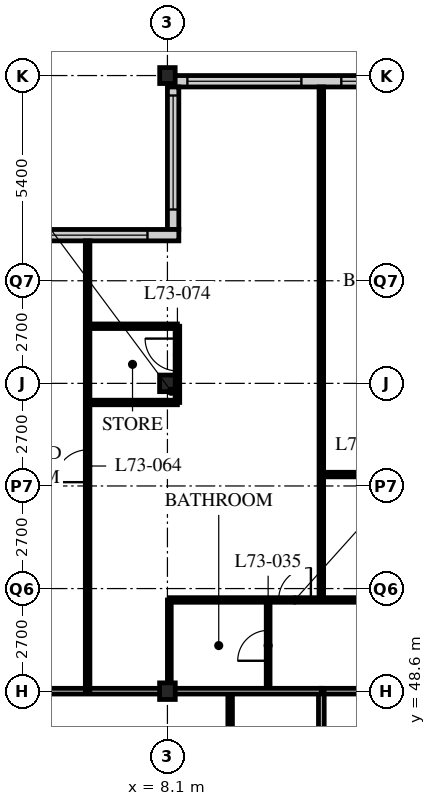
"""IFC4 building model, lengths in metres.
Left out: names, types, materials, properties, quantities, classifications, styles, units other than length and angle.
Written with IfcOpenShell. Run it as: python <this file> out.ifc"""

import sys

from ifc_helpers import new_model, si_unit, direction, frame, frame_2d, origin, origin_2d, place, context, subcontext, project, spatial, rectangle, i_section, extrude, element, fill, save


model = new_model("IFC4")
c1 = context("Model", 3, precision=1e-05, world=origin(), true_north=direction((0.0, 1.0)))
c2 = subcontext(c1, "Body", "Model", "MODEL_VIEW")
j1 = project(units=[si_unit("LENGTHUNIT", "METRE"), si_unit("PLANEANGLEUNIT", "RADIAN")], contexts=[c1])
p1 = place(None, origin())
s1 = spatial("IfcSite", under=j1, at=p1, CompositionType="ELEMENT")
p2 = place(p1, origin())
s2 = spatial("IfcBuilding", under=s1, at=p2, CompositionType="ELEMENT")
p3 = place(p2, frame((0.0, 0.0, 285.3)))
s3 = spatial("IfcBuildingStorey", under=s2, at=p3, CompositionType="ELEMENT", Elevation=285.3)
for number, where, z_axis, x_axis in (
    (1, (8.1, 48.6, 0.0), (0.0, 0.0, 1.0), (1.0, 0.0, 0.0)),
    (2, (8.1, 56.7, 0.0), (0.0, 0.0, 1.0), (1.0, 0.0, 0.0)),
):
    element("IfcColumn", number, at=place(p3, frame(where, z_axis=z_axis, x_axis=x_axis)), inside=s3, PredefinedType="COLUMN", context=c2, shape_type="SweptSolid", body=[
        extrude(i_section(OverallWidth=0.412, OverallDepth=0.437, WebThickness=0.036, FlangeThickness=0.058, FilletRadius=0.015, at=origin_2d()), origin(), (0.0, 0.0, 1.0), 3.9),
    ])
p4 = place(p3, frame((8.1, 64.8, 0.0), z_axis=(0.0, 0.0, 1.0), x_axis=(1.0, 0.0, 0.0)))
e3 = element("IfcColumn", 3, at=p4, inside=s3, PredefinedType="COLUMN", context=c2, shape_type="SweptSolid", body=[
    extrude(i_section(OverallWidth=0.407, OverallDepth=0.419, WebThickness=0.031, FlangeThickness=0.049, FilletRadius=0.015, at=origin_2d()), origin(), (0.0, 0.0, 1.0), 3.9),
])
p5 = place(p3, frame((48.3, 64.65, 0.0), z_axis=(0.0, 0.0, 1.0), x_axis=(-1.0, 0.0, 0.0)))
e4 = element("IfcWall", 4, at=p5, inside=s3, PredefinedType="SOLIDWALL", context=c2, shape_type="SweptSolid", body=[
    extrude(rectangle(XDim=40.2, YDim=0.3, at=frame_2d((20.1, 0.0))), origin(), (0.0, 0.0, 1.0), 3.69),
])
p6 = place(p5, frame((0.225, 0.0, 0.6)))
e5 = element("IfcOpeningElement", 5, at=p6, cuts=e4, PredefinedType="OPENING", context=c2, shape_type="SweptSolid", body=[
    extrude(rectangle(XDim=3.0, YDim=2.4, at=frame_2d((1.5, 1.2))), frame((0.0, 0.16, 0.0), z_axis=(0.0, -1.0, 0.0), x_axis=(1.0, 0.0, 0.0)), (0.0, 0.0, 1.0), 0.32),
])
p7 = place(p5, frame((4.275, 0.0, 0.6)))
e6 = element("IfcOpeningElement", 6, at=p7, cuts=e4, PredefinedType="OPENING", context=c2, shape_type="SweptSolid", body=[
    extrude(rectangle(XDim=3.0, YDim=2.4, at=frame_2d((1.5, 1.2))), frame((0.0, 0.16, 0.0), z_axis=(0.0, -1.0, 0.0), x_axis=(1.0, 0.0, 0.0)), (0.0, 0.0, 1.0), 0.32),
])
p8 = place(p5, frame((8.325, 0.0, 0.6)))
e7 = element("IfcOpeningElement", 7, at=p8, cuts=e4, PredefinedType="OPENING", context=c2, shape_type="SweptSolid", body=[
    extrude(rectangle(XDim=3.0, YDim=2.4, at=frame_2d((1.5, 1.2))), frame((0.0, 0.16, 0.0), z_axis=(0.0, -1.0, 0.0), x_axis=(1.0, 0.0, 0.0)), (0.0, 0.0, 1.0), 0.32),
])
p9 = place(p5, frame((12.375, 0.0, 0.6)))
e8 = element("IfcOpeningElement", 8, at=p9, cuts=e4, PredefinedType="OPENING", context=c2, shape_type="SweptSolid", body=[
    extrude(rectangle(XDim=3.0, YDim=2.4, at=frame_2d((1.5, 1.2))), frame((0.0, 0.16, 0.0), z_axis=(0.0, -1.0, 0.0), x_axis=(1.0, 0.0, 0.0)), (0.0, 0.0, 1.0), 0.32),
])
p10 = place(p5, frame((16.425, 0.0, 0.6)))
e9 = element("IfcOpeningElement", 9, at=p10, cuts=e4, PredefinedType="OPENING", context=c2, shape_type="SweptSolid", body=[
    extrude(rectangle(XDim=3.0, YDim=2.4, at=frame_2d((1.5, 1.2))), frame((0.0, 0.16, 0.0), z_axis=(0.0, -1.0, 0.0), x_axis=(1.0, 0.0, 0.0)), (0.0, 0.0, 1.0), 0.32),
])
p11 = place(p5, frame((20.475, 0.0, 0.6)))
e10 = element("IfcOpeningElement", 10, at=p11, cuts=e4, PredefinedType="OPENING", context=c2, shape_type="SweptSolid", body=[
    extrude(rectangle(XDim=3.0, YDim=2.4, at=frame_2d((1.5, 1.2))), frame((0.0, 0.16, 0.0), z_axis=(0.0, -1.0, 0.0), x_axis=(1.0, 0.0, 0.0)), (0.0, 0.0, 1.0), 0.32),
])
p12 = place(p5, frame((24.525, 0.0, 0.6)))
e11 = element("IfcOpeningElement", 11, at=p12, cuts=e4, PredefinedType="OPENING", context=c2, shape_type="SweptSolid", body=[
    extrude(rectangle(XDim=3.0, YDim=2.4, at=frame_2d((1.5, 1.2))), frame((0.0, 0.16, 0.0), z_axis=(0.0, -1.0, 0.0), x_axis=(1.0, 0.0, 0.0)), (0.0, 0.0, 1.0), 0.32),
])
p13 = place(p5, frame((28.575, 0.0, 0.6)))
e12 = element("IfcOpeningElement", 12, at=p13, cuts=e4, PredefinedType="OPENING", context=c2, shape_type="SweptSolid", body=[
    extrude(rectangle(XDim=3.0, YDim=2.4, at=frame_2d((1.5, 1.2))), frame((0.0, 0.16, 0.0), z_axis=(0.0, -1.0, 0.0), x_axis=(1.0, 0.0, 0.0)), (0.0, 0.0, 1.0), 0.32),
])
p14 = place(p5, frame((32.625, 0.0, 0.6)))
e13 = element("IfcOpeningElement", 13, at=p14, cuts=e4, PredefinedType="OPENING", context=c2, shape_type="SweptSolid", body=[
    extrude(rectangle(XDim=3.0, YDim=2.4, at=frame_2d((1.5, 1.2))), frame((0.0, 0.16, 0.0), z_axis=(0.0, -1.0, 0.0), x_axis=(1.0, 0.0, 0.0)), (0.0, 0.0, 1.0), 0.32),
])
p15 = place(p5, frame((36.675, 0.0, 0.6)))
e14 = element("IfcOpeningElement", 14, at=p15, cuts=e4, PredefinedType="OPENING", context=c2, shape_type="SweptSolid", body=[
    extrude(rectangle(XDim=3.0, YDim=2.4, at=frame_2d((1.5, 1.2))), frame((0.0, 0.16, 0.0), z_axis=(0.0, -1.0, 0.0), x_axis=(1.0, 0.0, 0.0)), (0.0, 0.0, 1.0), 0.32),
])
p16 = place(p3, frame((8.25, 64.5, 0.0), z_axis=(0.0, 0.0, 1.0), x_axis=(0.0, -1.0, 0.0)))
e15 = element("IfcWall", 15, at=p16, inside=s3, PredefinedType="SOLIDWALL", context=c2, shape_type="SweptSolid", body=[
    extrude(rectangle(XDim=3.75, YDim=0.3, at=frame_2d((1.875, 0.0))), origin(), (0.0, 0.0, 1.0), 3.69),
])
p17 = place(p16, frame((0.225, 0.0, 0.6)))
e16 = element("IfcOpeningElement", 16, at=p17, cuts=e15, PredefinedType="OPENING", context=c2, shape_type="SweptSolid", body=[
    extrude(rectangle(XDim=3.0, YDim=2.3, at=frame_2d((1.5, 1.15))), frame((0.0, 0.16, 0.0), z_axis=(0.0, -1.0, 0.0), x_axis=(1.0, 0.0, 0.0)), (0.0, 0.0, 1.0), 0.32),
])
p18 = place(p3, frame((8.4, 60.6, 0.0), z_axis=(0.0, 0.0, 1.0), x_axis=(-1.0, 0.0, 0.0)))
e17 = element("IfcWall", 17, at=p18, inside=s3, PredefinedType="SOLIDWALL", context=c2, shape_type="SweptSolid", body=[
    extrude(rectangle(XDim=4.35, YDim=0.3, at=frame_2d((2.175, 0.0))), origin(), (0.0, 0.0, 1.0), 3.69),
])
p19 = place(p18, frame((0.825, 0.0, 0.6)))
e18 = element("IfcOpeningElement", 18, at=p19, cuts=e17, PredefinedType="OPENING", context=c2, shape_type="SweptSolid", body=[
    extrude(rectangle(XDim=3.0, YDim=2.3, at=frame_2d((1.5, 1.15))), frame((0.0, 0.16, 0.0), z_axis=(0.0, -1.0, 0.0), x_axis=(1.0, 0.0, 0.0)), (0.0, 0.0, 1.0), 0.32),
])
p20 = place(p3, frame((12.15, 48.6, 0.0), z_axis=(0.0, 0.0, 1.0), x_axis=(1.0, 0.0, 0.0)))
e19 = element("IfcWall", 19, at=p20, inside=s3, PredefinedType="PARTITIONING", context=c2, shape_type="SweptSolid", body=[
    extrude(rectangle(XDim=24.3, YDim=0.15, at=frame_2d((12.15, 0.0))), origin(), (0.0, 0.0, 1.0), 3.078),
])
p21 = place(p20, frame((4.95, 0.0, 0.0)))
e20 = element("IfcOpeningElement", 20, at=p21, cuts=e19, PredefinedType="OPENING", context=c2, shape_type="SweptSolid", body=[
    extrude(rectangle(XDim=1.0, YDim=2.1, at=frame_2d((0.5, 1.05))), frame((0.0, 0.085, 0.0), z_axis=(0.0, -1.0, 0.0), x_axis=(1.0, 0.0, 0.0)), (0.0, 0.0, 1.0), 0.17),
])
p22 = place(p20, frame((16.6, 0.0, 0.0)))
e21 = element("IfcOpeningElement", 21, at=p22, cuts=e19, PredefinedType="OPENING", context=c2, shape_type="SweptSolid", body=[
    extrude(rectangle(XDim=1.0, YDim=2.1, at=frame_2d((0.5, 1.05))), frame((0.0, 0.085, 0.0), z_axis=(0.0, -1.0, 0.0), x_axis=(1.0, 0.0, 0.0)), (0.0, 0.0, 1.0), 0.17),
])
p23 = place(p20, frame((1.525, 0.0, 0.0)))
e22 = element("IfcOpeningElement", 22, at=p23, cuts=e19, PredefinedType="OPENING", context=c2, shape_type="SweptSolid", body=[
    extrude(rectangle(XDim=1.0, YDim=2.1, at=frame_2d((0.5, 1.05))), frame((0.0, 0.085, 0.0), z_axis=(0.0, -1.0, 0.0), x_axis=(1.0, 0.0, 0.0)), (0.0, 0.0, 1.0), 0.17),
])
p24 = place(p3, frame((12.15, 22.5, 0.0), z_axis=(0.0, 0.0, 1.0), x_axis=(0.0, 1.0, 0.0)))
e23 = element("IfcWall", 23, at=p24, inside=s3, PredefinedType="PARTITIONING", context=c2, shape_type="SweptSolid", body=[
    extrude(rectangle(XDim=26.1, YDim=0.15, at=frame_2d((13.05, 0.0))), origin(), (0.0, 0.0, 1.0), 3.69),
])
p25 = place(p24, frame((0.4, 0.0, 0.0)))
e24 = element("IfcOpeningElement", 24, at=p25, cuts=e23, PredefinedType="OPENING", context=c2, shape_type="SweptSolid", body=[
    extrude(rectangle(XDim=1.0, YDim=2.1, at=frame_2d((0.5, 1.05))), frame((0.0, 0.085, 0.0), z_axis=(0.0, -1.0, 0.0), x_axis=(1.0, 0.0, 0.0)), (0.0, 0.0, 1.0), 0.17),
])
p26 = place(p3, frame((9.75, 22.5, 0.0), z_axis=(0.0, 0.0, 1.0), x_axis=(0.0, 1.0, 0.0)))
e25 = element("IfcWall", 25, at=p26, inside=s3, PredefinedType="PARTITIONING", context=c2, shape_type="SweptSolid", body=[
    extrude(rectangle(XDim=26.1, YDim=0.12, at=frame_2d((13.05, 0.0))), origin(), (0.0, 0.0, 1.0), 3.69),
])
p27 = place(p26, frame((0.975, 0.0, 0.0)))
e26 = element("IfcOpeningElement", 26, at=p27, cuts=e25, PredefinedType="OPENING", context=c2, shape_type="SweptSolid", body=[
    extrude(rectangle(XDim=0.85, YDim=2.1, at=frame_2d((0.425, 1.05))), frame((0.0, 0.07, 0.0), z_axis=(0.0, -1.0, 0.0), x_axis=(1.0, 0.0, 0.0)), (0.0, 0.0, 1.0), 0.14),
])
p28 = place(p26, frame((10.225, 0.0, 0.0)))
e27 = element("IfcOpeningElement", 27, at=p28, cuts=e25, PredefinedType="OPENING", context=c2, shape_type="SweptSolid", body=[
    extrude(rectangle(XDim=0.85, YDim=2.1, at=frame_2d((0.425, 1.05))), frame((0.0, 0.07, 0.0), z_axis=(0.0, -1.0, 0.0), x_axis=(1.0, 0.0, 0.0)), (0.0, 0.0, 1.0), 0.14),
])
p29 = place(p26, frame((14.275, 0.0, 0.0)))
e28 = element("IfcOpeningElement", 28, at=p29, cuts=e25, PredefinedType="OPENING", context=c2, shape_type="SweptSolid", body=[
    extrude(rectangle(XDim=0.85, YDim=2.1, at=frame_2d((0.425, 1.05))), frame((0.0, 0.07, 0.0), z_axis=(0.0, -1.0, 0.0), x_axis=(1.0, 0.0, 0.0)), (0.0, 0.0, 1.0), 0.14),
])
p30 = place(p26, frame((18.325, 0.0, 0.0)))
e29 = element("IfcOpeningElement", 29, at=p30, cuts=e25, PredefinedType="OPENING", context=c2, shape_type="SweptSolid", body=[
    extrude(rectangle(XDim=0.85, YDim=2.1, at=frame_2d((0.425, 1.05))), frame((0.0, 0.07, 0.0), z_axis=(0.0, -1.0, 0.0), x_axis=(1.0, 0.0, 0.0)), (0.0, 0.0, 1.0), 0.14),
])
p31 = place(p26, frame((22.375, 0.0, 0.0)))
e30 = element("IfcOpeningElement", 30, at=p31, cuts=e25, PredefinedType="OPENING", context=c2, shape_type="SweptSolid", body=[
    extrude(rectangle(XDim=0.85, YDim=2.1, at=frame_2d((0.425, 1.05))), frame((0.0, 0.07, 0.0), z_axis=(0.0, -1.0, 0.0), x_axis=(1.0, 0.0, 0.0)), (0.0, 0.0, 1.0), 0.14),
])
p32 = place(p3, frame((10.75, 48.6, 0.0), z_axis=(0.0, 0.0, 1.0), x_axis=(0.0, 1.0, 0.0)))
e31 = element("IfcWall", 31, at=p32, inside=s3, PredefinedType="PARTITIONING", context=c2, shape_type="SweptSolid", body=[
    extrude(rectangle(XDim=2.4, YDim=0.1, at=frame_2d((1.2, 0.0))), origin(), (0.0, 0.0, 1.0), 3.69),
])
p33 = place(p32, frame((0.8, 0.0, 0.0)))
e32 = element("IfcOpeningElement", 32, at=p33, cuts=e31, PredefinedType="OPENING", context=c2, shape_type="SweptSolid", body=[
    extrude(rectangle(XDim=0.8, YDim=2.1, at=frame_2d((0.4, 1.05))), frame((0.0, 0.06, 0.0), z_axis=(0.0, -1.0, 0.0), x_axis=(1.0, 0.0, 0.0)), (0.0, 0.0, 1.0), 0.12),
])
p34 = place(p3, frame((8.15, 48.6, 0.0), z_axis=(0.0, 0.0, 1.0), x_axis=(0.0, 1.0, 0.0)))
e33 = element("IfcWall", 33, at=p34, inside=s3, PredefinedType="PARTITIONING", context=c2, shape_type="SweptSolid", body=[
    extrude(rectangle(XDim=2.4, YDim=0.1, at=frame_2d((1.2, 0.0))), origin(), (0.0, 0.0, 1.0), 3.078),
])
p35 = place(p3, frame((8.15, 51.0, 0.0), z_axis=(0.0, 0.0, 1.0), x_axis=(1.0, 0.0, 0.0)))
e34 = element("IfcWall", 34, at=p35, inside=s3, PredefinedType="PARTITIONING", context=c2, shape_type="SweptSolid", body=[
    extrude(rectangle(XDim=28.3, YDim=0.12, at=frame_2d((14.15, 0.0))), origin(), (0.0, 0.0, 1.0), 3.69),
])
p36 = place(p35, frame((9.025, 0.0, 0.0)))
e35 = element("IfcOpeningElement", 35, at=p36, cuts=e34, PredefinedType="OPENING", context=c2, shape_type="SweptSolid", body=[
    extrude(rectangle(XDim=0.85, YDim=2.1, at=frame_2d((0.425, 1.05))), frame((0.0, 0.07, 0.0), z_axis=(0.0, -1.0, 0.0), x_axis=(1.0, 0.0, 0.0)), (0.0, 0.0, 1.0), 0.14),
])
p37 = place(p35, frame((16.475, 0.0, 0.0)))
e36 = element("IfcOpeningElement", 36, at=p37, cuts=e34, PredefinedType="OPENING", context=c2, shape_type="SweptSolid", body=[
    extrude(rectangle(XDim=0.85, YDim=2.1, at=frame_2d((0.425, 1.05))), frame((0.0, 0.07, 0.0), z_axis=(0.0, -1.0, 0.0), x_axis=(1.0, 0.0, 0.0)), (0.0, 0.0, 1.0), 0.14),
])
p38 = place(p35, frame((21.175, 0.0, 0.0)))
e37 = element("IfcOpeningElement", 37, at=p38, cuts=e34, PredefinedType="OPENING", context=c2, shape_type="SweptSolid", body=[
    extrude(rectangle(XDim=0.85, YDim=2.1, at=frame_2d((0.425, 1.05))), frame((0.0, 0.07, 0.0), z_axis=(0.0, -1.0, 0.0), x_axis=(1.0, 0.0, 0.0)), (0.0, 0.0, 1.0), 0.14),
])
p39 = place(p35, frame((24.575, 0.0, 0.0)))
e38 = element("IfcOpeningElement", 38, at=p39, cuts=e34, PredefinedType="OPENING", context=c2, shape_type="SweptSolid", body=[
    extrude(rectangle(XDim=0.85, YDim=2.1, at=frame_2d((0.425, 1.05))), frame((0.0, 0.07, 0.0), z_axis=(0.0, -1.0, 0.0), x_axis=(1.0, 0.0, 0.0)), (0.0, 0.0, 1.0), 0.14),
])
p40 = place(p35, frame((6.725, 0.0, 0.0)))
e39 = element("IfcOpeningElement", 39, at=p40, cuts=e34, PredefinedType="OPENING", context=c2, shape_type="SweptSolid", body=[
    extrude(rectangle(XDim=0.85, YDim=2.1, at=frame_2d((0.425, 1.05))), frame((0.0, 0.07, 0.0), z_axis=(0.0, -1.0, 0.0), x_axis=(1.0, 0.0, 0.0)), (0.0, 0.0, 1.0), 0.14),
])
p41 = place(p35, frame((2.875, 0.0, 0.0)))
e40 = element("IfcOpeningElement", 40, at=p41, cuts=e34, PredefinedType="OPENING", context=c2, shape_type="SweptSolid", body=[
    extrude(rectangle(XDim=0.85, YDim=2.1, at=frame_2d((0.425, 1.05))), frame((0.0, 0.07, 0.0), z_axis=(0.0, -1.0, 0.0), x_axis=(1.0, 0.0, 0.0)), (0.0, 0.0, 1.0), 0.14),
])
p42 = place(p3, frame((12.15, 51.0, 0.0), z_axis=(0.0, 0.0, 1.0), x_axis=(0.0, 1.0, 0.0)))
e41 = element("IfcWall", 41, at=p42, inside=s3, PredefinedType="PARTITIONING", context=c2, shape_type="SweptSolid", body=[
    extrude(rectangle(XDim=13.5, YDim=0.12, at=frame_2d((6.75, 0.0))), origin(), (0.0, 0.0, 1.0), 3.69),
])
p43 = place(p3, frame((0.3, 48.6, 0.0), z_axis=(0.0, 0.0, 1.0), x_axis=(1.0, 0.0, 0.0)))
e42 = element("IfcWall", 42, at=p43, inside=s3, PredefinedType="PARTITIONING", context=c2, shape_type="SweptSolid", body=[
    extrude(rectangle(XDim=11.85, YDim=0.15, at=frame_2d((5.925, 0.0))), origin(), (0.0, 0.0, 1.0), 3.078),
])
p44 = place(p3, frame((12.15, 54.3, 0.0), z_axis=(0.0, 0.0, 1.0), x_axis=(1.0, 0.0, 0.0)))
e43 = element("IfcWall", 43, at=p44, inside=s3, PredefinedType="PARTITIONING", context=c2, shape_type="SweptSolid", body=[
    extrude(rectangle(XDim=4.05, YDim=0.12, at=frame_2d((2.025, 0.0))), origin(), (0.0, 0.0, 1.0), 3.69),
])
p45 = place(p44, frame((1.6, 0.0, 0.0)))
e44 = element("IfcOpeningElement", 44, at=p45, cuts=e43, PredefinedType="OPENING", context=c2, shape_type="SweptSolid", body=[
    extrude(rectangle(XDim=0.85, YDim=2.1, at=frame_2d((0.425, 1.05))), frame((0.0, 0.07, 0.0), z_axis=(0.0, -1.0, 0.0), x_axis=(1.0, 0.0, 0.0)), (0.0, 0.0, 1.0), 0.14),
])
p46 = place(p3, frame((6.0, 48.6, 0.0), z_axis=(0.0, 0.0, 1.0), x_axis=(0.0, 1.0, 0.0)))
e45 = element("IfcWall", 45, at=p46, inside=s3, PredefinedType="PARTITIONING", context=c2, shape_type="SweptSolid", body=[
    extrude(rectangle(XDim=11.85, YDim=0.12, at=frame_2d((5.925, 0.0))), origin(), (0.0, 0.0, 1.0), 3.69),
])
p47 = place(p46, frame((5.5, 0.0, 0.0)))
e46 = element("IfcOpeningElement", 46, at=p47, cuts=e45, PredefinedType="OPENING", context=c2, shape_type="SweptSolid", body=[
    extrude(rectangle(XDim=0.85, YDim=2.1, at=frame_2d((0.425, 1.05))), frame((0.0, 0.07, 0.0), z_axis=(0.0, -1.0, 0.0), x_axis=(1.0, 0.0, 0.0)), (0.0, 0.0, 1.0), 0.14),
])
for number, where, z_axis, x_axis in (
    (47, (6.0, 56.197, 0.0), (0.0, 0.0, 1.0), (1.0, 0.0, 0.0)),
    (48, (6.0, 58.203, 0.0), (0.0, 0.0, 1.0), (1.0, 0.0, 0.0)),
):
    element("IfcWall", number, at=place(p3, frame(where, z_axis=z_axis, x_axis=x_axis)), inside=s3, PredefinedType="PARTITIONING", context=c2, shape_type="SweptSolid", body=[
        extrude(rectangle(XDim=2.363, YDim=0.12, at=frame_2d((1.182, 0.0))), origin(), (0.0, 0.0, 1.0), 3.69),
    ])
p48 = place(p3, frame((8.363, 56.197, 0.0), z_axis=(0.0, 0.0, 1.0), x_axis=(0.0, 1.0, 0.0)))
e49 = element("IfcWall", 49, at=p48, inside=s3, PredefinedType="PARTITIONING", context=c2, shape_type="SweptSolid", body=[
    extrude(rectangle(XDim=2.006, YDim=0.12, at=frame_2d((1.003, 0.0))), origin(), (0.0, 0.0, 1.0), 3.69),
])
p49 = place(p48, frame((0.831, 0.0, 0.0)))
e50 = element("IfcOpeningElement", 50, at=p49, cuts=e49, PredefinedType="OPENING", context=c2, shape_type="SweptSolid", body=[
    extrude(rectangle(XDim=0.85, YDim=2.1, at=frame_2d((0.425, 1.05))), frame((0.0, 0.07, 0.0), z_axis=(0.0, -1.0, 0.0), x_axis=(1.0, 0.0, 0.0)), (0.0, 0.0, 1.0), 0.14),
])
p50 = place(p14, origin())
e51 = element("IfcWindow", 51, at=p50, inside=s3, PartitioningType="SINGLE_PANEL", PredefinedType="WINDOW", context=c2, shape_type="SweptSolid", body=[
    extrude(rectangle(XDim=3.0, YDim=2.4, at=frame_2d((1.5, 1.2))), frame((0.0, 0.03, 0.0), z_axis=(0.0, -1.0, 0.0), x_axis=(1.0, 0.0, 0.0)), (0.0, 0.0, 1.0), 0.06),
])
fill(e13, e51)
p51 = place(p15, origin())
e52 = element("IfcWindow", 52, at=p51, inside=s3, PartitioningType="SINGLE_PANEL", PredefinedType="WINDOW", context=c2, shape_type="SweptSolid", body=[
    extrude(rectangle(XDim=3.0, YDim=2.4, at=frame_2d((1.5, 1.2))), frame((0.0, 0.03, 0.0), z_axis=(0.0, -1.0, 0.0), x_axis=(1.0, 0.0, 0.0)), (0.0, 0.0, 1.0), 0.06),
])
fill(e14, e52)
p52 = place(p17, origin())
e53 = element("IfcWindow", 53, at=p52, inside=s3, PartitioningType="SINGLE_PANEL", PredefinedType="WINDOW", context=c2, shape_type="SweptSolid", body=[
    extrude(rectangle(XDim=3.0, YDim=2.3, at=frame_2d((1.5, 1.15))), frame((0.0, 0.03, 0.0), z_axis=(0.0, -1.0, 0.0), x_axis=(1.0, 0.0, 0.0)), (0.0, 0.0, 1.0), 0.06),
])
fill(e16, e53)
p53 = place(p19, origin())
e54 = element("IfcWindow", 54, at=p53, inside=s3, PartitioningType="SINGLE_PANEL", PredefinedType="WINDOW", context=c2, shape_type="SweptSolid", body=[
    extrude(rectangle(XDim=3.0, YDim=2.3, at=frame_2d((1.5, 1.15))), frame((0.0, 0.03, 0.0), z_axis=(0.0, -1.0, 0.0), x_axis=(1.0, 0.0, 0.0)), (0.0, 0.0, 1.0), 0.06),
])
fill(e18, e54)
p54 = place(p33, origin())
e55 = element("IfcDoor", 55, at=p54, inside=s3, OperationType="SINGLE_SWING_LEFT", PredefinedType="DOOR", context=c2, shape_type="SweptSolid", body=[
    extrude(rectangle(XDim=0.8, YDim=2.1, at=frame_2d((0.4, 1.05))), frame((0.0, 0.025, 0.0), z_axis=(0.0, -1.0, 0.0), x_axis=(1.0, 0.0, 0.0)), (0.0, 0.0, 1.0), 0.05),
])
fill(e32, e55)
p55 = place(p41, origin())
e56 = element("IfcDoor", 56, at=p55, inside=s3, OperationType="SINGLE_SWING_RIGHT", PredefinedType="DOOR", context=c2, shape_type="SweptSolid", body=[
    extrude(rectangle(XDim=0.85, YDim=2.1, at=frame_2d((0.425, 1.05))), frame((0.0, 0.025, 0.0), z_axis=(0.0, -1.0, 0.0), x_axis=(1.0, 0.0, 0.0)), (0.0, 0.0, 1.0), 0.05),
])
fill(e40, e56)
p56 = place(p47, origin())
e57 = element("IfcDoor", 57, at=p56, inside=s3, OperationType="SINGLE_SWING_LEFT", PredefinedType="DOOR", context=c2, shape_type="SweptSolid", body=[
    extrude(rectangle(XDim=0.85, YDim=2.1, at=frame_2d((0.425, 1.05))), frame((0.0, 0.025, 0.0), z_axis=(0.0, -1.0, 0.0), x_axis=(1.0, 0.0, 0.0)), (0.0, 0.0, 1.0), 0.05),
])
fill(e46, e57)
p57 = place(p49, origin())
e58 = element("IfcDoor", 58, at=p57, inside=s3, OperationType="SINGLE_SWING_RIGHT", PredefinedType="DOOR", context=c2, shape_type="SweptSolid", body=[
    extrude(rectangle(XDim=0.85, YDim=2.1, at=frame_2d((0.425, 1.05))), frame((0.0, 0.025, 0.0), z_axis=(0.0, -1.0, 0.0), x_axis=(1.0, 0.0, 0.0)), (0.0, 0.0, 1.0), 0.05),
])
fill(e50, e58)
save(model, sys.argv[1])
